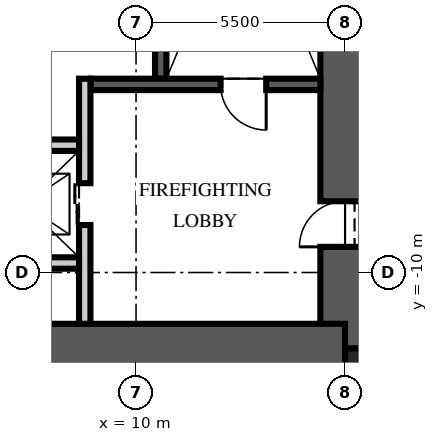
"""IFC4 building model, lengths in metres.
Left out: names, types, materials, properties, quantities, classifications, styles, units other than length and angle.
Written with IfcOpenShell. Run it as: python <this file> out.ifc"""

import sys

from ifc_helpers import new_model, si_unit, direction, frame, frame_2d, origin, origin_2d, place, context, subcontext, project, spatial, rectangle, extrude, element, fill, save


model = new_model("IFC4")
c1 = context("Model", 3, precision=1e-05, world=origin(), true_north=direction((0.0, 1.0)))
c2 = subcontext(c1, "Body", "Model", "MODEL_VIEW")
j1 = project(units=[si_unit("LENGTHUNIT", "METRE"), si_unit("PLANEANGLEUNIT", "RADIAN")], contexts=[c1])
p1 = place(None, origin())
s1 = spatial("IfcSite", under=j1, at=p1, CompositionType="ELEMENT")
p2 = place(p1, origin())
s2 = spatial("IfcBuilding", under=s1, at=p2, CompositionType="ELEMENT")
p3 = place(p2, frame((0.0, 0.0, 353.25)))
s3 = spatial("IfcBuildingStorey", under=s2, at=p3, CompositionType="ELEMENT", Elevation=353.25)
p4 = place(p3, frame((15.5, -12.0, -0.3), z_axis=(0.0, 0.0, 1.0), x_axis=(0.0, 1.0, 0.0)))
e1 = element("IfcWall", 1, at=p4, inside=s3, PredefinedType="SHEAR", context=c2, shape_type="SweptSolid", body=[
    extrude(rectangle(XDim=24.0, YDim=1.3, at=frame_2d((12.0, 0.0))), origin(), (0.0, 0.0, 1.0), 5.0),
])
p5 = place(p4, frame((2.675, 0.0, 0.3)))
e2 = element("IfcOpeningElement", 2, at=p5, cuts=e1, PredefinedType="OPENING", context=c2, shape_type="SweptSolid", body=[
    extrude(rectangle(XDim=1.2, YDim=2.1, at=frame_2d((0.6, 1.05))), frame((0.0, 0.66, 0.0), z_axis=(0.0, -1.0, 0.0), x_axis=(1.0, 0.0, 0.0)), (0.0, 0.0, 1.0), 1.32),
])
p6 = place(p4, frame((20.125, 0.0, 0.3)))
e3 = element("IfcOpeningElement", 3, at=p6, cuts=e1, PredefinedType="OPENING", context=c2, shape_type="SweptSolid", body=[
    extrude(rectangle(XDim=1.8, YDim=2.1, at=frame_2d((0.9, 1.05))), frame((0.0, 0.66, 0.0), z_axis=(0.0, -1.0, 0.0), x_axis=(1.0, 0.0, 0.0)), (0.0, 0.0, 1.0), 1.32),
])
p7 = place(p3, frame((-15.5, -12.0, -0.3), z_axis=(0.0, 0.0, 1.0), x_axis=(1.0, 0.0, 0.0)))
e4 = element("IfcWall", 4, at=p7, inside=s3, PredefinedType="SHEAR", context=c2, shape_type="SweptSolid", body=[
    extrude(rectangle(XDim=31.0, YDim=1.3, at=frame_2d((15.5, 0.0))), origin(), (0.0, 0.0, 1.0), 5.0),
])
p8 = place(p3, frame((15.825, -12.325, -0.3), z_axis=(0.0, 0.0, 1.0), x_axis=(1.0, 0.0, 0.0)))
e5 = element("IfcColumn", 5, at=p8, inside=s3, PredefinedType="COLUMN", context=c2, shape_type="SweptSolid", body=[
    extrude(rectangle(XDim=0.65, YDim=0.65, at=origin_2d()), origin(), (0.0, 0.0, 1.0), 5.0),
])
p9 = place(p3, frame((10.65, -4.9, 0.0), z_axis=(0.0, 0.0, 1.0), x_axis=(0.0, 1.0, 0.0)))
e6 = element("IfcWall", 6, at=p9, inside=s3, PredefinedType="SOLIDWALL", context=c2, shape_type="SweptSolid", body=[
    extrude(rectangle(XDim=10.1, YDim=0.3, at=frame_2d((5.05, 0.0))), origin(), (0.0, 0.0, 1.0), 4.7),
])
p10 = place(p3, frame((14.85, -5.05, 0.0), z_axis=(0.0, 0.0, 1.0), x_axis=(-1.0, 0.0, 0.0)))
e7 = element("IfcWall", 7, at=p10, inside=s3, PredefinedType="SOLIDWALL", context=c2, shape_type="SweptSolid", body=[
    extrude(rectangle(XDim=6.05, YDim=0.3, at=frame_2d((3.025, 0.0))), origin(), (0.0, 0.0, 1.0), 4.7),
])
p11 = place(p10, frame((1.425, 0.0, 0.0)))
e8 = element("IfcOpeningElement", 8, at=p11, cuts=e7, PredefinedType="OPENING", context=c2, shape_type="SweptSolid", body=[
    extrude(rectangle(XDim=1.2, YDim=2.1, at=frame_2d((0.6, 1.05))), frame((0.0, 0.16, 0.0), z_axis=(0.0, -1.0, 0.0), x_axis=(1.0, 0.0, 0.0)), (0.0, 0.0, 1.0), 0.32),
])
p12 = place(p3, frame((8.65, -11.35, 0.0), z_axis=(0.0, 0.0, 1.0), x_axis=(0.0, 1.0, 0.0)))
e9 = element("IfcWall", 9, at=p12, inside=s3, PredefinedType="PARTITIONING", context=c2, shape_type="SweptSolid", body=[
    extrude(rectangle(XDim=6.45, YDim=0.3, at=frame_2d((3.225, 0.0))), origin(), (0.0, 0.0, 1.0), 4.7),
])
p13 = place(p12, frame((2.6, 0.0, 0.0)))
e10 = element("IfcOpeningElement", 10, at=p13, cuts=e9, PredefinedType="OPENING", context=c2, shape_type="SweptSolid", body=[
    extrude(rectangle(XDim=1.1, YDim=2.1, at=frame_2d((0.55, 1.05))), frame((0.0, 0.16, 0.0), z_axis=(0.0, -1.0, 0.0), x_axis=(1.0, 0.0, 0.0)), (0.0, 0.0, 1.0), 0.32),
])
p14 = place(p3, frame((-8.5, -6.65, 0.0), z_axis=(0.0, 0.0, 1.0), x_axis=(1.0, 0.0, 0.0)))
e11 = element("IfcWall", 11, at=p14, inside=s3, PredefinedType="PARTITIONING", context=c2, shape_type="SweptSolid", body=[
    extrude(rectangle(XDim=17.0, YDim=0.3, at=frame_2d((8.5, 0.0))), origin(), (0.0, 0.0, 1.0), 4.7),
])
p15 = place(p14, frame((7.8, 0.0, 0.0)))
e12 = element("IfcOpeningElement", 12, at=p15, cuts=e11, PredefinedType="OPENING", context=c2, shape_type="SweptSolid", body=[
    extrude(rectangle(XDim=1.3, YDim=2.4, at=frame_2d((0.65, 1.2))), frame((0.0, 0.16, 0.0), z_axis=(0.0, -1.0, 0.0), x_axis=(1.0, 0.0, 0.0)), (0.0, 0.0, 1.0), 0.32),
])
p16 = place(p14, frame((5.65, 0.0, 0.0)))
e13 = element("IfcOpeningElement", 13, at=p16, cuts=e11, PredefinedType="OPENING", context=c2, shape_type="SweptSolid", body=[
    extrude(rectangle(XDim=0.9, YDim=2.1, at=frame_2d((0.45, 1.05))), frame((0.0, 0.16, 0.0), z_axis=(0.0, -1.0, 0.0), x_axis=(1.0, 0.0, 0.0)), (0.0, 0.0, 1.0), 0.32),
])
p17 = place(p14, frame((10.4, 0.0, 0.0)))
e14 = element("IfcOpeningElement", 14, at=p17, cuts=e11, PredefinedType="OPENING", context=c2, shape_type="SweptSolid", body=[
    extrude(rectangle(XDim=0.9, YDim=2.1, at=frame_2d((0.45, 1.05))), frame((0.0, 0.16, 0.0), z_axis=(0.0, -1.0, 0.0), x_axis=(1.0, 0.0, 0.0)), (0.0, 0.0, 1.0), 0.32),
])
p18 = place(p3, frame((5.6, -9.75, 0.0), z_axis=(0.0, 0.0, 1.0), x_axis=(1.0, 0.0, 0.0)))
e15 = element("IfcWall", 15, at=p18, inside=s3, PredefinedType="PARTITIONING", context=c2, shape_type="SweptSolid", body=[
    extrude(rectangle(XDim=2.9, YDim=0.3, at=frame_2d((1.45, 0.0))), origin(), (0.0, 0.0, 1.0), 4.7),
])
p19 = place(p11, origin())
e16 = element("IfcDoor", 16, at=p19, inside=s3, OperationType="SINGLE_SWING_LEFT", PredefinedType="DOOR", context=c2, shape_type="SweptSolid", body=[
    extrude(rectangle(XDim=1.2, YDim=2.1, at=frame_2d((0.6, 1.05))), frame((0.0, 0.025, 0.0), z_axis=(0.0, -1.0, 0.0), x_axis=(1.0, 0.0, 0.0)), (0.0, 0.0, 1.0), 0.05),
])
fill(e8, e16)
p20 = place(p5, origin())
e17 = element("IfcDoor", 17, at=p20, inside=s3, OperationType="SINGLE_SWING_LEFT", PredefinedType="DOOR", context=c2, shape_type="SweptSolid", body=[
    extrude(rectangle(XDim=1.2, YDim=2.1, at=frame_2d((0.6, 1.05))), frame((0.0, 0.025, 0.0), z_axis=(0.0, -1.0, 0.0), x_axis=(1.0, 0.0, 0.0)), (0.0, 0.0, 1.0), 0.05),
])
fill(e2, e17)
p21 = place(p13, origin())
e18 = element("IfcDoor", 18, at=p21, inside=s3, OperationType="DOUBLE_DOOR_SLIDING", PredefinedType="DOOR", context=c2, shape_type="SweptSolid", body=[
    extrude(rectangle(XDim=1.1, YDim=2.1, at=frame_2d((0.55, 1.05))), frame((0.0, 0.025, 0.0), z_axis=(0.0, -1.0, 0.0), x_axis=(1.0, 0.0, 0.0)), (0.0, 0.0, 1.0), 0.05),
])
fill(e10, e18)
save(model, sys.argv[1])
